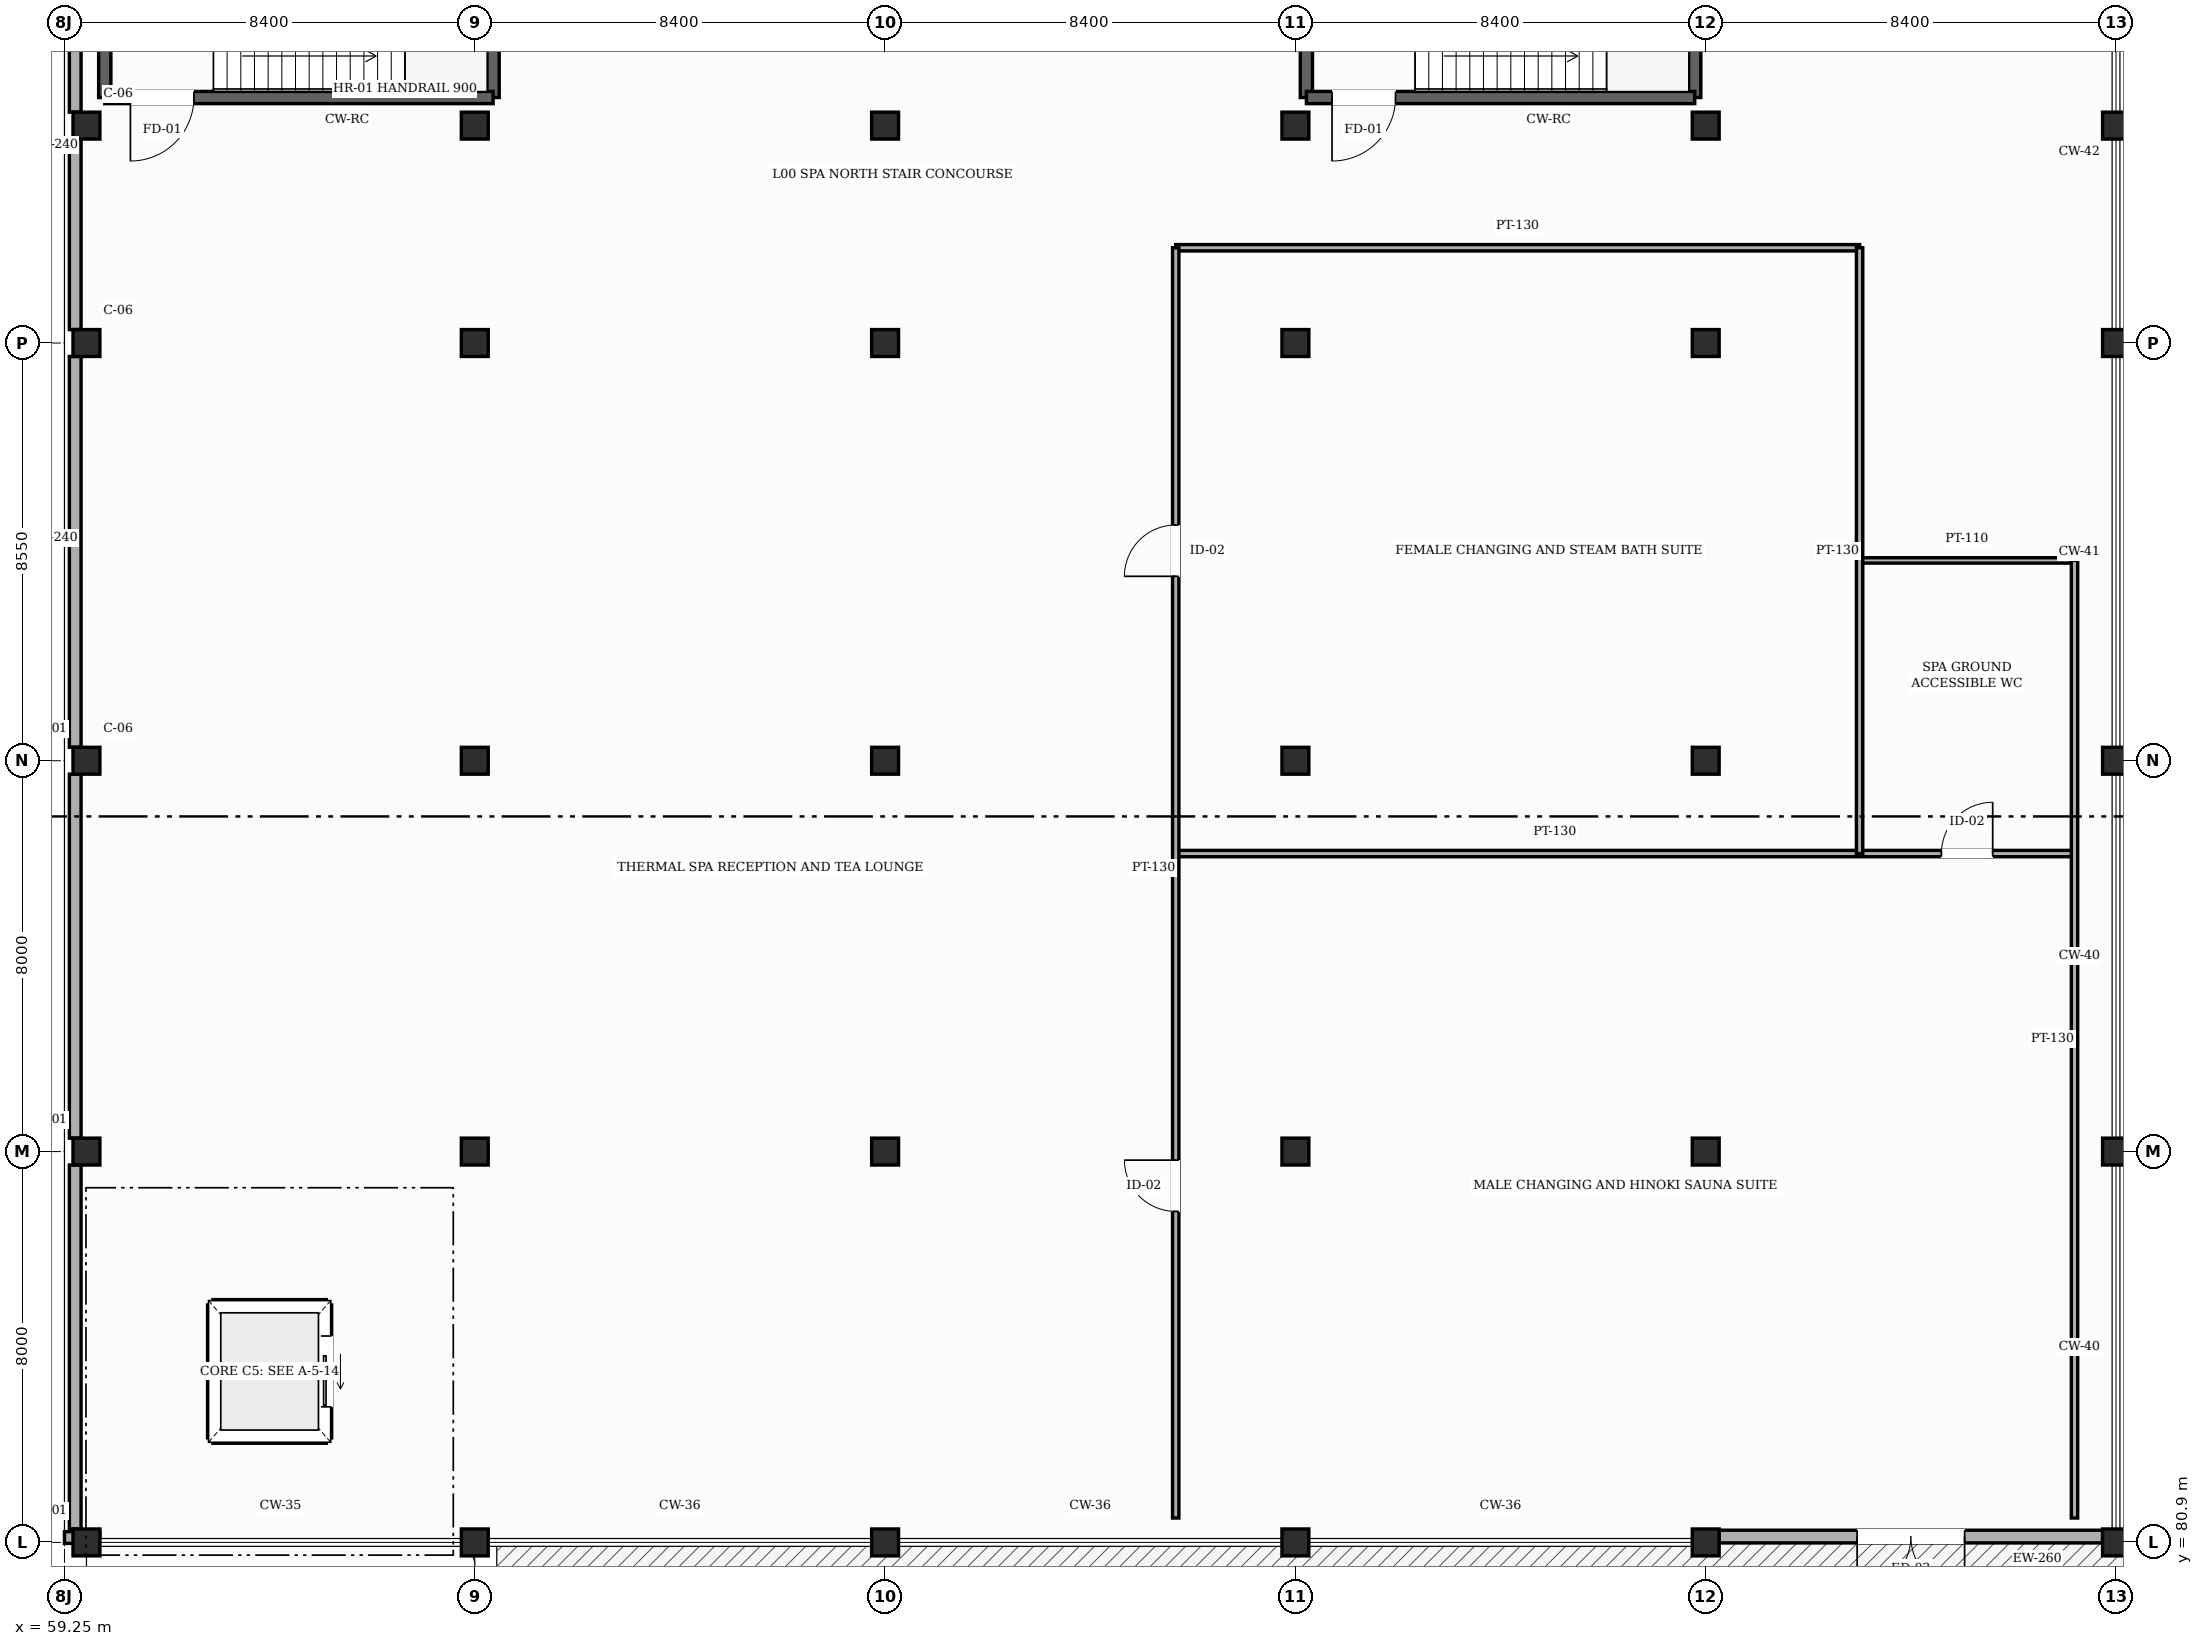
"""IFC4 building model, lengths in metres.
Left out: names, types, materials, properties, quantities, classifications, styles, units other than length and angle.
Written with IfcOpenShell. Run it as: python <this file> out.ifc"""

import sys

from ifc_helpers import new_model, si_unit, direction, frame, frame_2d, origin, origin_2d, place, context, subcontext, project, spatial, rectangle, hollow_rectangle, extrude, element, fill, save


model = new_model("IFC4")
c1 = context("Model", 3, precision=1e-05, world=origin(), true_north=direction((0.0, 1.0)))
c2 = subcontext(c1, "Body", "Model", "MODEL_VIEW")
j1 = project(units=[si_unit("LENGTHUNIT", "METRE"), si_unit("PLANEANGLEUNIT", "RADIAN")], contexts=[c1])
p1 = place(None, origin())
s1 = spatial("IfcSite", under=j1, at=p1, CompositionType="ELEMENT")
p2 = place(p1, origin())
s2 = spatial("IfcBuilding", under=s1, at=p2, CompositionType="ELEMENT")
p3 = place(p2, origin())
s3 = spatial("IfcBuildingStorey", under=s2, at=p3, CompositionType="ELEMENT", Elevation=0.0)
for number, where, z_axis, x_axis in (
    (1, (59.7, 80.9, 0.0), (0.0, 0.0, 1.0), (1.0, 0.0, 0.0)),
    (2, (59.7, 88.9, 0.0), (0.0, 0.0, 1.0), (1.0, 0.0, 0.0)),
    (3, (59.7, 96.9, 0.0), (0.0, 0.0, 1.0), (1.0, 0.0, 0.0)),
    (4, (59.7, 105.45, 0.0), (0.0, 0.0, 1.0), (1.0, 0.0, 0.0)),
    (5, (59.7, 109.9, 0.0), (0.0, 0.0, 1.0), (1.0, 0.0, 0.0)),
    (6, (67.65, 80.9, 0.0), (0.0, 0.0, 1.0), (1.0, 0.0, 0.0)),
    (7, (67.65, 88.9, 0.0), (0.0, 0.0, 1.0), (1.0, 0.0, 0.0)),
    (8, (67.65, 96.9, 0.0), (0.0, 0.0, 1.0), (1.0, 0.0, 0.0)),
    (9, (67.65, 105.45, 0.0), (0.0, 0.0, 1.0), (1.0, 0.0, 0.0)),
    (10, (67.65, 109.9, 0.0), (0.0, 0.0, 1.0), (1.0, 0.0, 0.0)),
    (11, (76.05, 80.9, 0.0), (0.0, 0.0, 1.0), (1.0, 0.0, 0.0)),
    (12, (76.05, 88.9, 0.0), (0.0, 0.0, 1.0), (1.0, 0.0, 0.0)),
    (13, (76.05, 96.9, 0.0), (0.0, 0.0, 1.0), (1.0, 0.0, 0.0)),
    (14, (76.05, 105.45, 0.0), (0.0, 0.0, 1.0), (1.0, 0.0, 0.0)),
    (15, (76.05, 109.9, 0.0), (0.0, 0.0, 1.0), (1.0, 0.0, 0.0)),
    (16, (84.45, 80.9, 0.0), (0.0, 0.0, 1.0), (1.0, 0.0, 0.0)),
    (17, (84.45, 88.9, 0.0), (0.0, 0.0, 1.0), (1.0, 0.0, 0.0)),
    (18, (84.45, 96.9, 0.0), (0.0, 0.0, 1.0), (1.0, 0.0, 0.0)),
    (19, (84.45, 105.45, 0.0), (0.0, 0.0, 1.0), (1.0, 0.0, 0.0)),
    (20, (84.45, 109.9, 0.0), (0.0, 0.0, 1.0), (1.0, 0.0, 0.0)),
    (21, (92.85, 80.9, 0.0), (0.0, 0.0, 1.0), (1.0, 0.0, 0.0)),
    (22, (92.85, 88.9, 0.0), (0.0, 0.0, 1.0), (1.0, 0.0, 0.0)),
    (23, (92.85, 96.9, 0.0), (0.0, 0.0, 1.0), (1.0, 0.0, 0.0)),
    (24, (92.85, 105.45, 0.0), (0.0, 0.0, 1.0), (1.0, 0.0, 0.0)),
    (25, (92.85, 109.9, 0.0), (0.0, 0.0, 1.0), (1.0, 0.0, 0.0)),
    (26, (101.25, 80.9, 0.0), (0.0, 0.0, 1.0), (1.0, 0.0, 0.0)),
    (27, (101.25, 88.9, 0.0), (0.0, 0.0, 1.0), (1.0, 0.0, 0.0)),
    (28, (101.25, 96.9, 0.0), (0.0, 0.0, 1.0), (1.0, 0.0, 0.0)),
    (29, (101.25, 105.45, 0.0), (0.0, 0.0, 1.0), (1.0, 0.0, 0.0)),
    (30, (101.25, 109.9, 0.0), (0.0, 0.0, 1.0), (1.0, 0.0, 0.0)),
):
    element("IfcColumn", number, at=place(p3, frame(where, z_axis=z_axis, x_axis=x_axis)), inside=s3, PredefinedType="COLUMN", context=c2, shape_type="SweptSolid", body=[
        extrude(hollow_rectangle(XDim=0.55, YDim=0.55, WallThickness=0.022, InnerFilletRadius=0.022, OuterFilletRadius=0.044, at=origin_2d()), origin(), (0.0, 0.0, 1.0), 5.4),
    ])
p4 = place(p3, frame((100.975, 81.02, 0.0), z_axis=(0.0, 0.0, 1.0), x_axis=(-1.0, 0.0, 0.0)))
e31 = element("IfcWall", 31, at=p4, inside=s3, PredefinedType="SOLIDWALL", context=c2, shape_type="SweptSolid", body=[
    extrude(rectangle(XDim=7.85, YDim=0.26, at=frame_2d((3.925, 0.0))), origin(), (0.0, 0.0, 1.0), 4.525),
])
p5 = place(p4, frame((2.825, 0.0, 0.0)))
e32 = element("IfcOpeningElement", 32, at=p5, cuts=e31, PredefinedType="OPENING", context=c2, shape_type="SweptSolid", body=[
    extrude(rectangle(XDim=2.2, YDim=2.5, at=frame_2d((1.1, 1.25))), frame((0.0, 0.14, 0.0), z_axis=(0.0, -1.0, 0.0), x_axis=(1.0, 0.0, 0.0)), (0.0, 0.0, 1.0), 0.28),
])
p6 = place(p3, frame((59.975, 81.0, 0.0), z_axis=(0.0, 0.0, 1.0), x_axis=(-1.0, 0.0, 0.0)))
e33 = element("IfcWall", 33, at=p6, inside=s3, PredefinedType="SOLIDWALL", context=c2, shape_type="SweptSolid", body=[
    extrude(rectangle(XDim=0.725, YDim=0.24, at=frame_2d((0.363, 0.0))), origin(), (0.0, 0.0, 1.0), 5.135),
])
for number, where, z_axis, x_axis in (
    (34, (59.47, 81.175, 0.0), (0.0, 0.0, 1.0), (0.0, 1.0, 0.0)),
    (35, (59.47, 89.175, 0.0), (0.0, 0.0, 1.0), (0.0, 1.0, 0.0)),
):
    element("IfcWall", number, at=place(p3, frame(where, z_axis=z_axis, x_axis=x_axis)), inside=s3, PredefinedType="SOLIDWALL", context=c2, shape_type="SweptSolid", body=[
        extrude(rectangle(XDim=7.45, YDim=0.24, at=frame_2d((3.725, 0.0))), origin(), (0.0, 0.0, 1.0), 4.475),
    ])
p7 = place(p3, frame((59.47, 97.175, 0.0), z_axis=(0.0, 0.0, 1.0), x_axis=(0.0, 1.0, 0.0)))
e36 = element("IfcWall", 36, at=p7, inside=s3, PredefinedType="SOLIDWALL", context=c2, shape_type="SweptSolid", body=[
    extrude(rectangle(XDim=8.0, YDim=0.24, at=frame_2d((4.0, 0.0))), origin(), (0.0, 0.0, 1.0), 4.475),
])
p8 = place(p3, frame((59.47, 105.725, 0.0), z_axis=(0.0, 0.0, 1.0), x_axis=(0.0, 1.0, 0.0)))
e37 = element("IfcWall", 37, at=p8, inside=s3, PredefinedType="SOLIDWALL", context=c2, shape_type="SweptSolid", body=[
    extrude(rectangle(XDim=3.9, YDim=0.24, at=frame_2d((1.95, 0.0))), origin(), (0.0, 0.0, 1.0), 4.475),
])
p9 = place(p3, frame((59.47, 110.175, 0.0), z_axis=(0.0, 0.0, 1.0), x_axis=(0.0, 1.0, 0.0)))
e38 = element("IfcWall", 38, at=p9, inside=s3, PredefinedType="SOLIDWALL", context=c2, shape_type="SweptSolid", body=[
    extrude(rectangle(XDim=3.575, YDim=0.24, at=frame_2d((1.788, 0.0))), origin(), (0.0, 0.0, 1.0), 5.135),
])
for number, where, z_axis, x_axis in (
    (39, (60.075, 110.475, 0.0), (0.0, 0.0, 1.0), (0.0, 1.0, 0.0)),
    (40, (68.025, 113.825, 0.0), (0.0, 0.0, 1.0), (0.0, -1.0, 0.0)),
):
    element("IfcWall", number, at=place(p3, frame(where, z_axis=z_axis, x_axis=x_axis)), inside=s3, PredefinedType="SHEAR", context=c2, shape_type="SweptSolid", body=[
        extrude(rectangle(XDim=3.35, YDim=0.25, at=frame_2d((1.675, 0.0))), origin(), (0.0, 0.0, 1.0), 5.15),
    ])
p10 = place(p3, frame((68.025, 110.475, 0.0), z_axis=(0.0, 0.0, 1.0), x_axis=(-1.0, 0.0, 0.0)))
e41 = element("IfcWall", 41, at=p10, inside=s3, PredefinedType="SHEAR", context=c2, shape_type="SweptSolid", body=[
    extrude(rectangle(XDim=7.95, YDim=0.25, at=frame_2d((3.975, 0.0))), origin(), (0.0, 0.0, 1.0), 5.15),
])
p11 = place(p10, frame((6.125, 0.0, 0.0)))
e42 = element("IfcOpeningElement", 42, at=p11, cuts=e41, PredefinedType="OPENING", context=c2, shape_type="SweptSolid", body=[
    extrude(rectangle(XDim=1.3, YDim=2.2, at=frame_2d((0.65, 1.1))), frame((0.0, 0.135, 0.0), z_axis=(0.0, -1.0, 0.0), x_axis=(1.0, 0.0, 0.0)), (0.0, 0.0, 1.0), 0.27),
])
for number, where, z_axis, x_axis in (
    (43, (84.675, 110.475, 0.0), (0.0, 0.0, 1.0), (0.0, 1.0, 0.0)),
    (44, (92.625, 113.825, 0.0), (0.0, 0.0, 1.0), (0.0, -1.0, 0.0)),
):
    element("IfcWall", number, at=place(p3, frame(where, z_axis=z_axis, x_axis=x_axis)), inside=s3, PredefinedType="SHEAR", context=c2, shape_type="SweptSolid", body=[
        extrude(rectangle(XDim=3.35, YDim=0.25, at=frame_2d((1.675, 0.0))), origin(), (0.0, 0.0, 1.0), 5.15),
    ])
p12 = place(p3, frame((92.625, 110.475, 0.0), z_axis=(0.0, 0.0, 1.0), x_axis=(-1.0, 0.0, 0.0)))
e45 = element("IfcWall", 45, at=p12, inside=s3, PredefinedType="SHEAR", context=c2, shape_type="SweptSolid", body=[
    extrude(rectangle(XDim=7.95, YDim=0.25, at=frame_2d((3.975, 0.0))), origin(), (0.0, 0.0, 1.0), 5.15),
])
p13 = place(p12, frame((6.125, 0.0, 0.0)))
e46 = element("IfcOpeningElement", 46, at=p13, cuts=e45, PredefinedType="OPENING", context=c2, shape_type="SweptSolid", body=[
    extrude(rectangle(XDim=1.3, YDim=2.2, at=frame_2d((0.65, 1.1))), frame((0.0, 0.135, 0.0), z_axis=(0.0, -1.0, 0.0), x_axis=(1.0, 0.0, 0.0)), (0.0, 0.0, 1.0), 0.27),
])
for number, where, z_axis, x_axis in (
    (47, (62.29, 85.76, 0.0), (0.0, 0.0, 1.0), (1.0, 0.0, 0.0)),
    (48, (62.29, 83.04, 0.0), (0.0, 0.0, 1.0), (1.0, 0.0, 0.0)),
):
    element("IfcWall", number, at=place(p3, frame(where, z_axis=z_axis, x_axis=x_axis)), inside=s3, PredefinedType="SHEAR", context=c2, shape_type="SweptSolid", body=[
        extrude(rectangle(XDim=2.32, YDim=0.22, at=frame_2d((1.16, 0.0))), origin(), (0.0, 0.0, 1.0), 5.15),
    ])
p14 = place(p3, frame((64.61, 83.04, 0.0), z_axis=(0.0, 0.0, 1.0), x_axis=(0.0, 1.0, 0.0)))
e49 = element("IfcWall", 49, at=p14, inside=s3, PredefinedType="SHEAR", context=c2, shape_type="SweptSolid", body=[
    extrude(rectangle(XDim=2.72, YDim=0.22, at=frame_2d((1.36, 0.0))), origin(), (0.0, 0.0, 1.0), 5.15),
])
p15 = place(p14, frame((0.635, 0.0, 0.0)))
e50 = element("IfcOpeningElement", 50, at=p15, cuts=e49, PredefinedType="OPENING", context=c2, shape_type="SweptSolid", body=[
    extrude(rectangle(XDim=1.45, YDim=2.35, at=frame_2d((0.725, 1.175))), frame((0.0, 0.12, 0.0), z_axis=(0.0, -1.0, 0.0), x_axis=(1.0, 0.0, 0.0)), (0.0, 0.0, 1.0), 0.24),
])
p16 = place(p3, frame((62.29, 83.04, 0.0), z_axis=(0.0, 0.0, 1.0), x_axis=(0.0, 1.0, 0.0)))
e51 = element("IfcWall", 51, at=p16, inside=s3, PredefinedType="SHEAR", context=c2, shape_type="SweptSolid", body=[
    extrude(rectangle(XDim=2.72, YDim=0.22, at=frame_2d((1.36, 0.0))), origin(), (0.0, 0.0, 1.0), 5.15),
])
p17 = place(p3, frame((82.0, 95.0, 0.0), z_axis=(0.0, 0.0, 1.0), x_axis=(1.0, 0.0, 0.0)))
e52 = element("IfcWall", 52, at=p17, inside=s3, PredefinedType="PARTITIONING", context=c2, shape_type="SweptSolid", body=[
    extrude(rectangle(XDim=18.4, YDim=0.13, at=frame_2d((9.2, 0.0))), origin(), (0.0, 0.0, 1.0), 5.135),
])
p18 = place(p17, frame((15.675, 0.0, 0.0)))
e53 = element("IfcOpeningElement", 53, at=p18, cuts=e52, PredefinedType="OPENING", context=c2, shape_type="SweptSolid", body=[
    extrude(rectangle(XDim=1.05, YDim=2.2, at=frame_2d((0.525, 1.1))), frame((0.0, 0.075, 0.0), z_axis=(0.0, -1.0, 0.0), x_axis=(1.0, 0.0, 0.0)), (0.0, 0.0, 1.0), 0.15),
])
p19 = place(p3, frame((96.0, 101.0, 0.0), z_axis=(0.0, 0.0, 1.0), x_axis=(1.0, 0.0, 0.0)))
e54 = element("IfcWall", 54, at=p19, inside=s3, PredefinedType="PARTITIONING", context=c2, shape_type="SweptSolid", body=[
    extrude(rectangle(XDim=4.4, YDim=0.11, at=frame_2d((2.2, 0.0))), origin(), (0.0, 0.0, 1.0), 4.725),
])
p20 = place(p3, frame((82.0, 107.4, 0.0), z_axis=(0.0, 0.0, 1.0), x_axis=(1.0, 0.0, 0.0)))
e55 = element("IfcWall", 55, at=p20, inside=s3, PredefinedType="PARTITIONING", context=c2, shape_type="SweptSolid", body=[
    extrude(rectangle(XDim=14.0, YDim=0.13, at=frame_2d((7.0, 0.0))), origin(), (0.0, 0.0, 1.0), 4.725),
])
p21 = place(p3, frame((82.0, 81.4, 0.0), z_axis=(0.0, 0.0, 1.0), x_axis=(0.0, 1.0, 0.0)))
e56 = element("IfcWall", 56, at=p21, inside=s3, PredefinedType="PARTITIONING", context=c2, shape_type="SweptSolid", body=[
    extrude(rectangle(XDim=26.0, YDim=0.13, at=frame_2d((13.0, 0.0))), origin(), (0.0, 0.0, 1.0), 5.135),
])
p22 = place(p21, frame((6.275, 0.0, 0.0)))
e57 = element("IfcOpeningElement", 57, at=p22, cuts=e56, PredefinedType="OPENING", context=c2, shape_type="SweptSolid", body=[
    extrude(rectangle(XDim=1.05, YDim=2.2, at=frame_2d((0.525, 1.1))), frame((0.0, 0.075, 0.0), z_axis=(0.0, -1.0, 0.0), x_axis=(1.0, 0.0, 0.0)), (0.0, 0.0, 1.0), 0.15),
])
p23 = place(p21, frame((19.275, 0.0, 0.0)))
e58 = element("IfcOpeningElement", 58, at=p23, cuts=e56, PredefinedType="OPENING", context=c2, shape_type="SweptSolid", body=[
    extrude(rectangle(XDim=1.05, YDim=2.2, at=frame_2d((0.525, 1.1))), frame((0.0, 0.075, 0.0), z_axis=(0.0, -1.0, 0.0), x_axis=(1.0, 0.0, 0.0)), (0.0, 0.0, 1.0), 0.15),
])
p24 = place(p3, frame((96.0, 95.0, 0.0), z_axis=(0.0, 0.0, 1.0), x_axis=(0.0, 1.0, 0.0)))
e59 = element("IfcWall", 59, at=p24, inside=s3, PredefinedType="PARTITIONING", context=c2, shape_type="SweptSolid", body=[
    extrude(rectangle(XDim=12.4, YDim=0.13, at=frame_2d((6.2, 0.0))), origin(), (0.0, 0.0, 1.0), 5.135),
])
p25 = place(p3, frame((100.4, 81.4, 0.0), z_axis=(0.0, 0.0, 1.0), x_axis=(0.0, 1.0, 0.0)))
e60 = element("IfcWall", 60, at=p25, inside=s3, PredefinedType="PARTITIONING", context=c2, shape_type="SweptSolid", body=[
    extrude(rectangle(XDim=19.6, YDim=0.13, at=frame_2d((9.8, 0.0))), origin(), (0.0, 0.0, 1.0), 5.135),
])
p26 = place(p5, origin())
e61 = element("IfcDoor", 61, at=p26, inside=s3, OperationType="DOUBLE_DOOR_SINGLE_SWING", PredefinedType="DOOR", context=c2, shape_type="SweptSolid", body=[
    extrude(rectangle(XDim=2.2, YDim=2.5, at=frame_2d((1.1, 1.25))), frame((0.0, 0.025, 0.0), z_axis=(0.0, -1.0, 0.0), x_axis=(1.0, 0.0, 0.0)), (0.0, 0.0, 1.0), 0.05),
])
fill(e32, e61)
p27 = place(p11, origin())
e62 = element("IfcDoor", 62, at=p27, inside=s3, OperationType="SINGLE_SWING_RIGHT", PredefinedType="DOOR", context=c2, shape_type="SweptSolid", body=[
    extrude(rectangle(XDim=1.3, YDim=2.2, at=frame_2d((0.65, 1.1))), frame((0.0, 0.025, 0.0), z_axis=(0.0, -1.0, 0.0), x_axis=(1.0, 0.0, 0.0)), (0.0, 0.0, 1.0), 0.05),
])
fill(e42, e62)
p28 = place(p13, origin())
e63 = element("IfcDoor", 63, at=p28, inside=s3, OperationType="SINGLE_SWING_RIGHT", PredefinedType="DOOR", context=c2, shape_type="SweptSolid", body=[
    extrude(rectangle(XDim=1.3, YDim=2.2, at=frame_2d((0.65, 1.1))), frame((0.0, 0.025, 0.0), z_axis=(0.0, -1.0, 0.0), x_axis=(1.0, 0.0, 0.0)), (0.0, 0.0, 1.0), 0.05),
])
fill(e46, e63)
p29 = place(p15, origin())
e64 = element("IfcDoor", 64, at=p29, inside=s3, OperationType="SLIDING_TO_LEFT", PredefinedType="DOOR", context=c2, shape_type="SweptSolid", body=[
    extrude(rectangle(XDim=1.45, YDim=2.35, at=frame_2d((0.725, 1.175))), frame((0.0, 0.025, 0.0), z_axis=(0.0, -1.0, 0.0), x_axis=(1.0, 0.0, 0.0)), (0.0, 0.0, 1.0), 0.05),
])
fill(e50, e64)
p30 = place(p22, origin())
e65 = element("IfcDoor", 65, at=p30, inside=s3, OperationType="SINGLE_SWING_RIGHT", PredefinedType="DOOR", context=c2, shape_type="SweptSolid", body=[
    extrude(rectangle(XDim=1.05, YDim=2.2, at=frame_2d((0.525, 1.1))), frame((0.0, 0.025, 0.0), z_axis=(0.0, -1.0, 0.0), x_axis=(1.0, 0.0, 0.0)), (0.0, 0.0, 1.0), 0.05),
])
fill(e57, e65)
p31 = place(p23, origin())
e66 = element("IfcDoor", 66, at=p31, inside=s3, OperationType="SINGLE_SWING_LEFT", PredefinedType="DOOR", context=c2, shape_type="SweptSolid", body=[
    extrude(rectangle(XDim=1.05, YDim=2.2, at=frame_2d((0.525, 1.1))), frame((0.0, 0.025, 0.0), z_axis=(0.0, -1.0, 0.0), x_axis=(1.0, 0.0, 0.0)), (0.0, 0.0, 1.0), 0.05),
])
fill(e58, e66)
p32 = place(p18, origin())
e67 = element("IfcDoor", 67, at=p32, inside=s3, OperationType="SINGLE_SWING_RIGHT", PredefinedType="DOOR", context=c2, shape_type="SweptSolid", body=[
    extrude(rectangle(XDim=1.05, YDim=2.2, at=frame_2d((0.525, 1.1))), frame((0.0, 0.025, 0.0), z_axis=(0.0, -1.0, 0.0), x_axis=(1.0, 0.0, 0.0)), (0.0, 0.0, 1.0), 0.05),
])
fill(e53, e67)
save(model, sys.argv[1])
